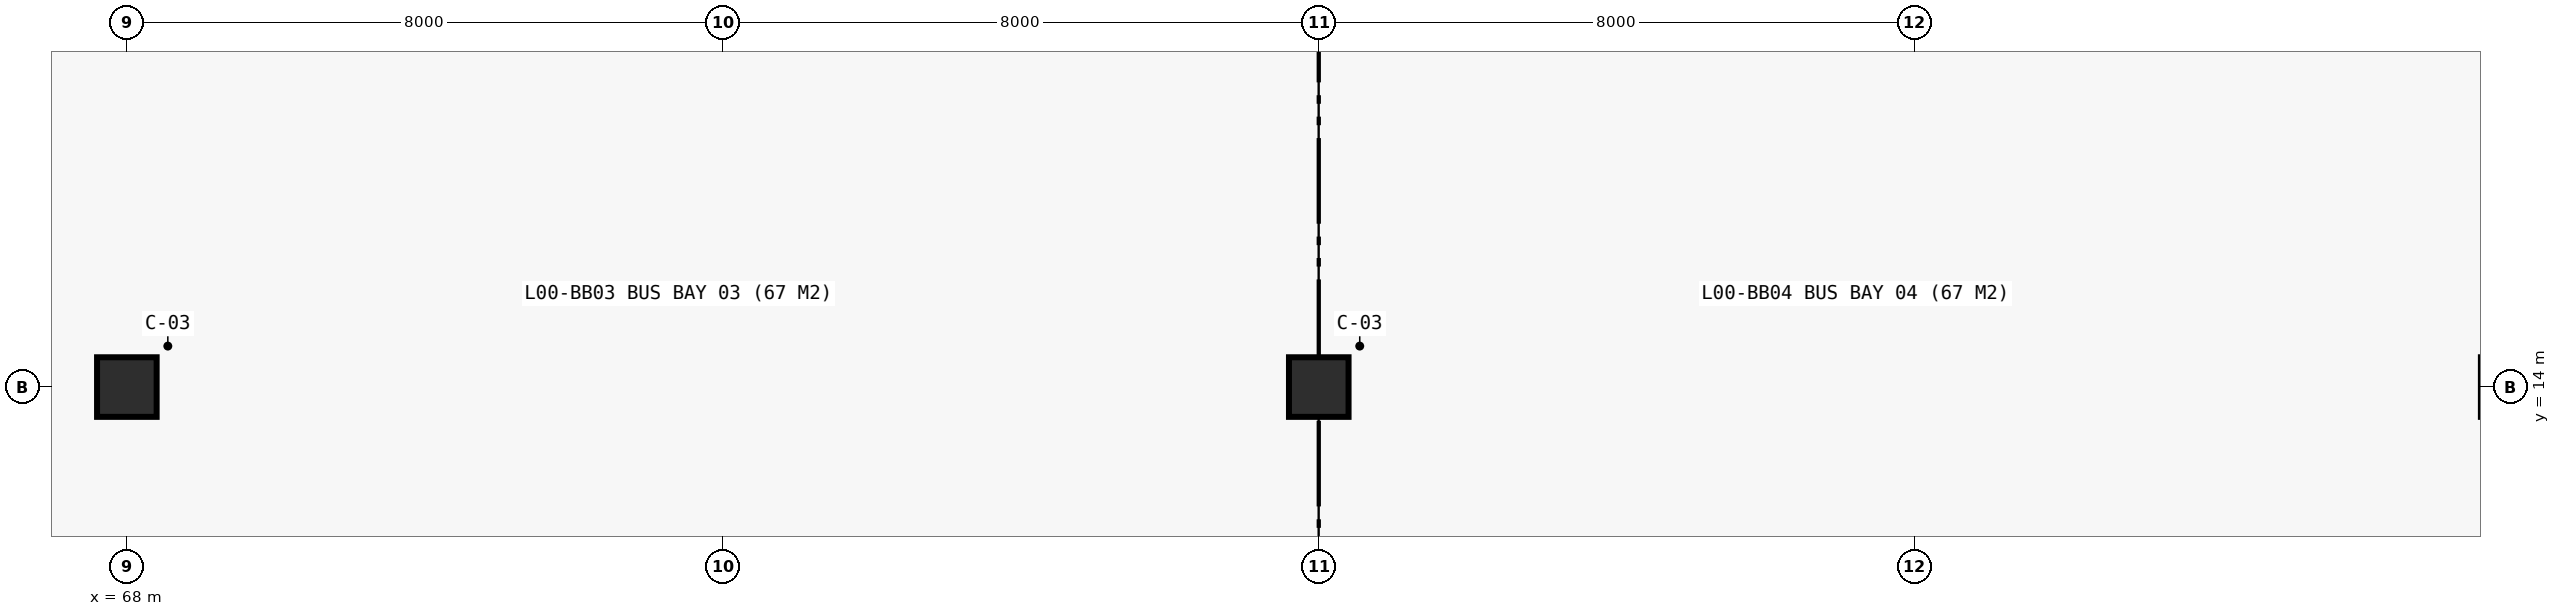
"""IFC4 building model, lengths in metres.
Left out: names, types, materials, properties, quantities, classifications, styles, units other than length and angle.
Written with IfcOpenShell. Run it as: python <this file> out.ifc"""

import sys

from ifc_helpers import new_model, si_unit, direction, frame, origin, origin_2d, place, context, subcontext, project, spatial, rectangle, extrude, element, save


model = new_model("IFC4")
c1 = context("Model", 3, precision=1e-05, world=origin(), true_north=direction((0.0, 1.0)))
c2 = subcontext(c1, "Body", "Model", "MODEL_VIEW")
j1 = project(units=[si_unit("LENGTHUNIT", "METRE"), si_unit("PLANEANGLEUNIT", "RADIAN")], contexts=[c1])
p1 = place(None, origin())
s1 = spatial("IfcSite", under=j1, at=p1, CompositionType="ELEMENT")
p2 = place(p1, origin())
s2 = spatial("IfcBuilding", under=s1, at=p2, CompositionType="ELEMENT")
p3 = place(p2, origin())
s3 = spatial("IfcBuildingStorey", under=s2, at=p3, CompositionType="ELEMENT", Elevation=0.0)
for number, where, z_axis, x_axis in (
    (1, (68.0, 14.0, 0.0), (0.0, 0.0, 1.0), (1.0, 0.0, 0.0)),
    (2, (84.0, 14.0, 0.0), (0.0, 0.0, 1.0), (1.0, 0.0, 0.0)),
    (3, (100.0, 14.0, 0.0), (0.0, 0.0, 1.0), (1.0, 0.0, 0.0)),
):
    element("IfcColumn", number, at=place(p3, frame(where, z_axis=z_axis, x_axis=x_axis)), inside=s3, PredefinedType="COLUMN", context=c2, shape_type="SweptSolid", body=[
        extrude(rectangle(XDim=0.8, YDim=0.8, at=origin_2d()), origin(), (0.0, 0.0, 1.0), 6.6),
    ])
save(model, sys.argv[1])
